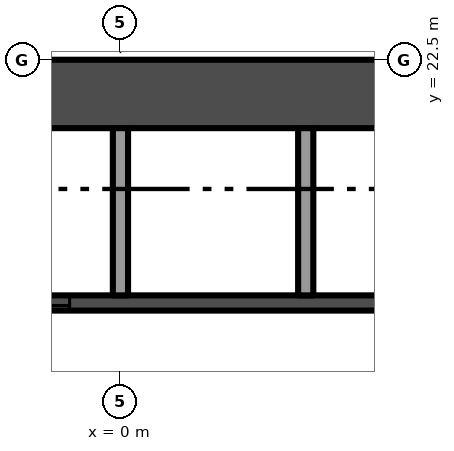
"""IFC4 building model, lengths in metres.
Left out: names, types, materials, properties, quantities, classifications, styles, units other than length and angle.
Written with IfcOpenShell. Run it as: python <this file> out.ifc"""

import sys

from ifc_helpers import new_model, si_unit, direction, frame, frame_2d, origin, place, context, subcontext, project, spatial, rectangle, extrude, element, fill, save


model = new_model("IFC4")
c1 = context("Model", 3, precision=1e-05, world=origin(), true_north=direction((0.0, 1.0)))
c2 = subcontext(c1, "Body", "Model", "MODEL_VIEW")
j1 = project(units=[si_unit("LENGTHUNIT", "METRE"), si_unit("PLANEANGLEUNIT", "RADIAN")], contexts=[c1])
p1 = place(None, origin())
s1 = spatial("IfcSite", under=j1, at=p1, CompositionType="ELEMENT")
p2 = place(p1, origin())
s2 = spatial("IfcBuilding", under=s1, at=p2, CompositionType="ELEMENT")
p3 = place(p2, frame((0.0, 0.0, 73.2)))
s3 = spatial("IfcBuildingStorey", under=s2, at=p3, CompositionType="ELEMENT", Elevation=73.2)
p4 = place(p3, frame((13.5, 22.05, -0.3), z_axis=(0.0, 0.0, 1.0), x_axis=(-1.0, 0.0, 0.0)))
e1 = element("IfcWall", 1, at=p4, inside=s3, PredefinedType="SHEAR", context=c2, shape_type="SweptSolid", body=[
    extrude(rectangle(XDim=27.0, YDim=0.9, at=frame_2d((13.5, 0.0))), origin(), (0.0, 0.0, 1.0), 3.8),
])
p5 = place(p3, frame((-9.85, 19.3, 0.0), z_axis=(0.0, 0.0, 1.0), x_axis=(1.0, 0.0, 0.0)))
e2 = element("IfcWall", 2, at=p5, inside=s3, PredefinedType="SHEAR", context=c2, shape_type="SweptSolid", body=[
    extrude(rectangle(XDim=19.7, YDim=0.2, at=frame_2d((9.85, 0.0))), origin(), (0.0, 0.0, 1.0), 3.5),
])
p6 = place(p5, frame((0.769, 0.0, 0.0)))
e3 = element("IfcOpeningElement", 3, at=p6, cuts=e2, PredefinedType="OPENING", context=c2, shape_type="SweptSolid", body=[
    extrude(rectangle(XDim=1.1, YDim=2.1, at=frame_2d((0.55, 1.05))), frame((0.0, 0.11, 0.0), z_axis=(0.0, -1.0, 0.0), x_axis=(1.0, 0.0, 0.0)), (0.0, 0.0, 1.0), 0.22),
])
p7 = place(p5, frame((3.206, 0.0, 0.0)))
e4 = element("IfcOpeningElement", 4, at=p7, cuts=e2, PredefinedType="OPENING", context=c2, shape_type="SweptSolid", body=[
    extrude(rectangle(XDim=1.1, YDim=2.1, at=frame_2d((0.55, 1.05))), frame((0.0, 0.11, 0.0), z_axis=(0.0, -1.0, 0.0), x_axis=(1.0, 0.0, 0.0)), (0.0, 0.0, 1.0), 0.22),
])
p8 = place(p5, frame((5.644, 0.0, 0.0)))
e5 = element("IfcOpeningElement", 5, at=p8, cuts=e2, PredefinedType="OPENING", context=c2, shape_type="SweptSolid", body=[
    extrude(rectangle(XDim=1.1, YDim=2.1, at=frame_2d((0.55, 1.05))), frame((0.0, 0.11, 0.0), z_axis=(0.0, -1.0, 0.0), x_axis=(1.0, 0.0, 0.0)), (0.0, 0.0, 1.0), 0.22),
])
p9 = place(p5, frame((8.081, 0.0, 0.0)))
e6 = element("IfcOpeningElement", 6, at=p9, cuts=e2, PredefinedType="OPENING", context=c2, shape_type="SweptSolid", body=[
    extrude(rectangle(XDim=1.1, YDim=2.1, at=frame_2d((0.55, 1.05))), frame((0.0, 0.11, 0.0), z_axis=(0.0, -1.0, 0.0), x_axis=(1.0, 0.0, 0.0)), (0.0, 0.0, 1.0), 0.22),
])
for number, where, z_axis, x_axis in (
    (7, (0.0, 19.4, 0.0), (0.0, 0.0, 1.0), (0.0, 1.0, 0.0)),
    (8, (2.438, 19.4, 0.0), (0.0, 0.0, 1.0), (0.0, 1.0, 0.0)),
):
    element("IfcWall", number, at=place(p3, frame(where, z_axis=z_axis, x_axis=x_axis)), inside=s3, PredefinedType="PARTITIONING", context=c2, shape_type="SweptSolid", body=[
        extrude(rectangle(XDim=2.2, YDim=0.2, at=frame_2d((1.1, 0.0))), origin(), (0.0, 0.0, 1.0), 3.5),
    ])
p10 = place(p9, origin())
e9 = element("IfcDoor", 9, at=p10, inside=s3, OperationType="SLIDING_TO_LEFT", PredefinedType="DOOR", context=c2, shape_type="SweptSolid", body=[
    extrude(rectangle(XDim=1.1, YDim=2.1, at=frame_2d((0.55, 1.05))), frame((0.0, 0.025, 0.0), z_axis=(0.0, -1.0, 0.0), x_axis=(1.0, 0.0, 0.0)), (0.0, 0.0, 1.0), 0.05),
])
fill(e6, e9)
save(model, sys.argv[1])
